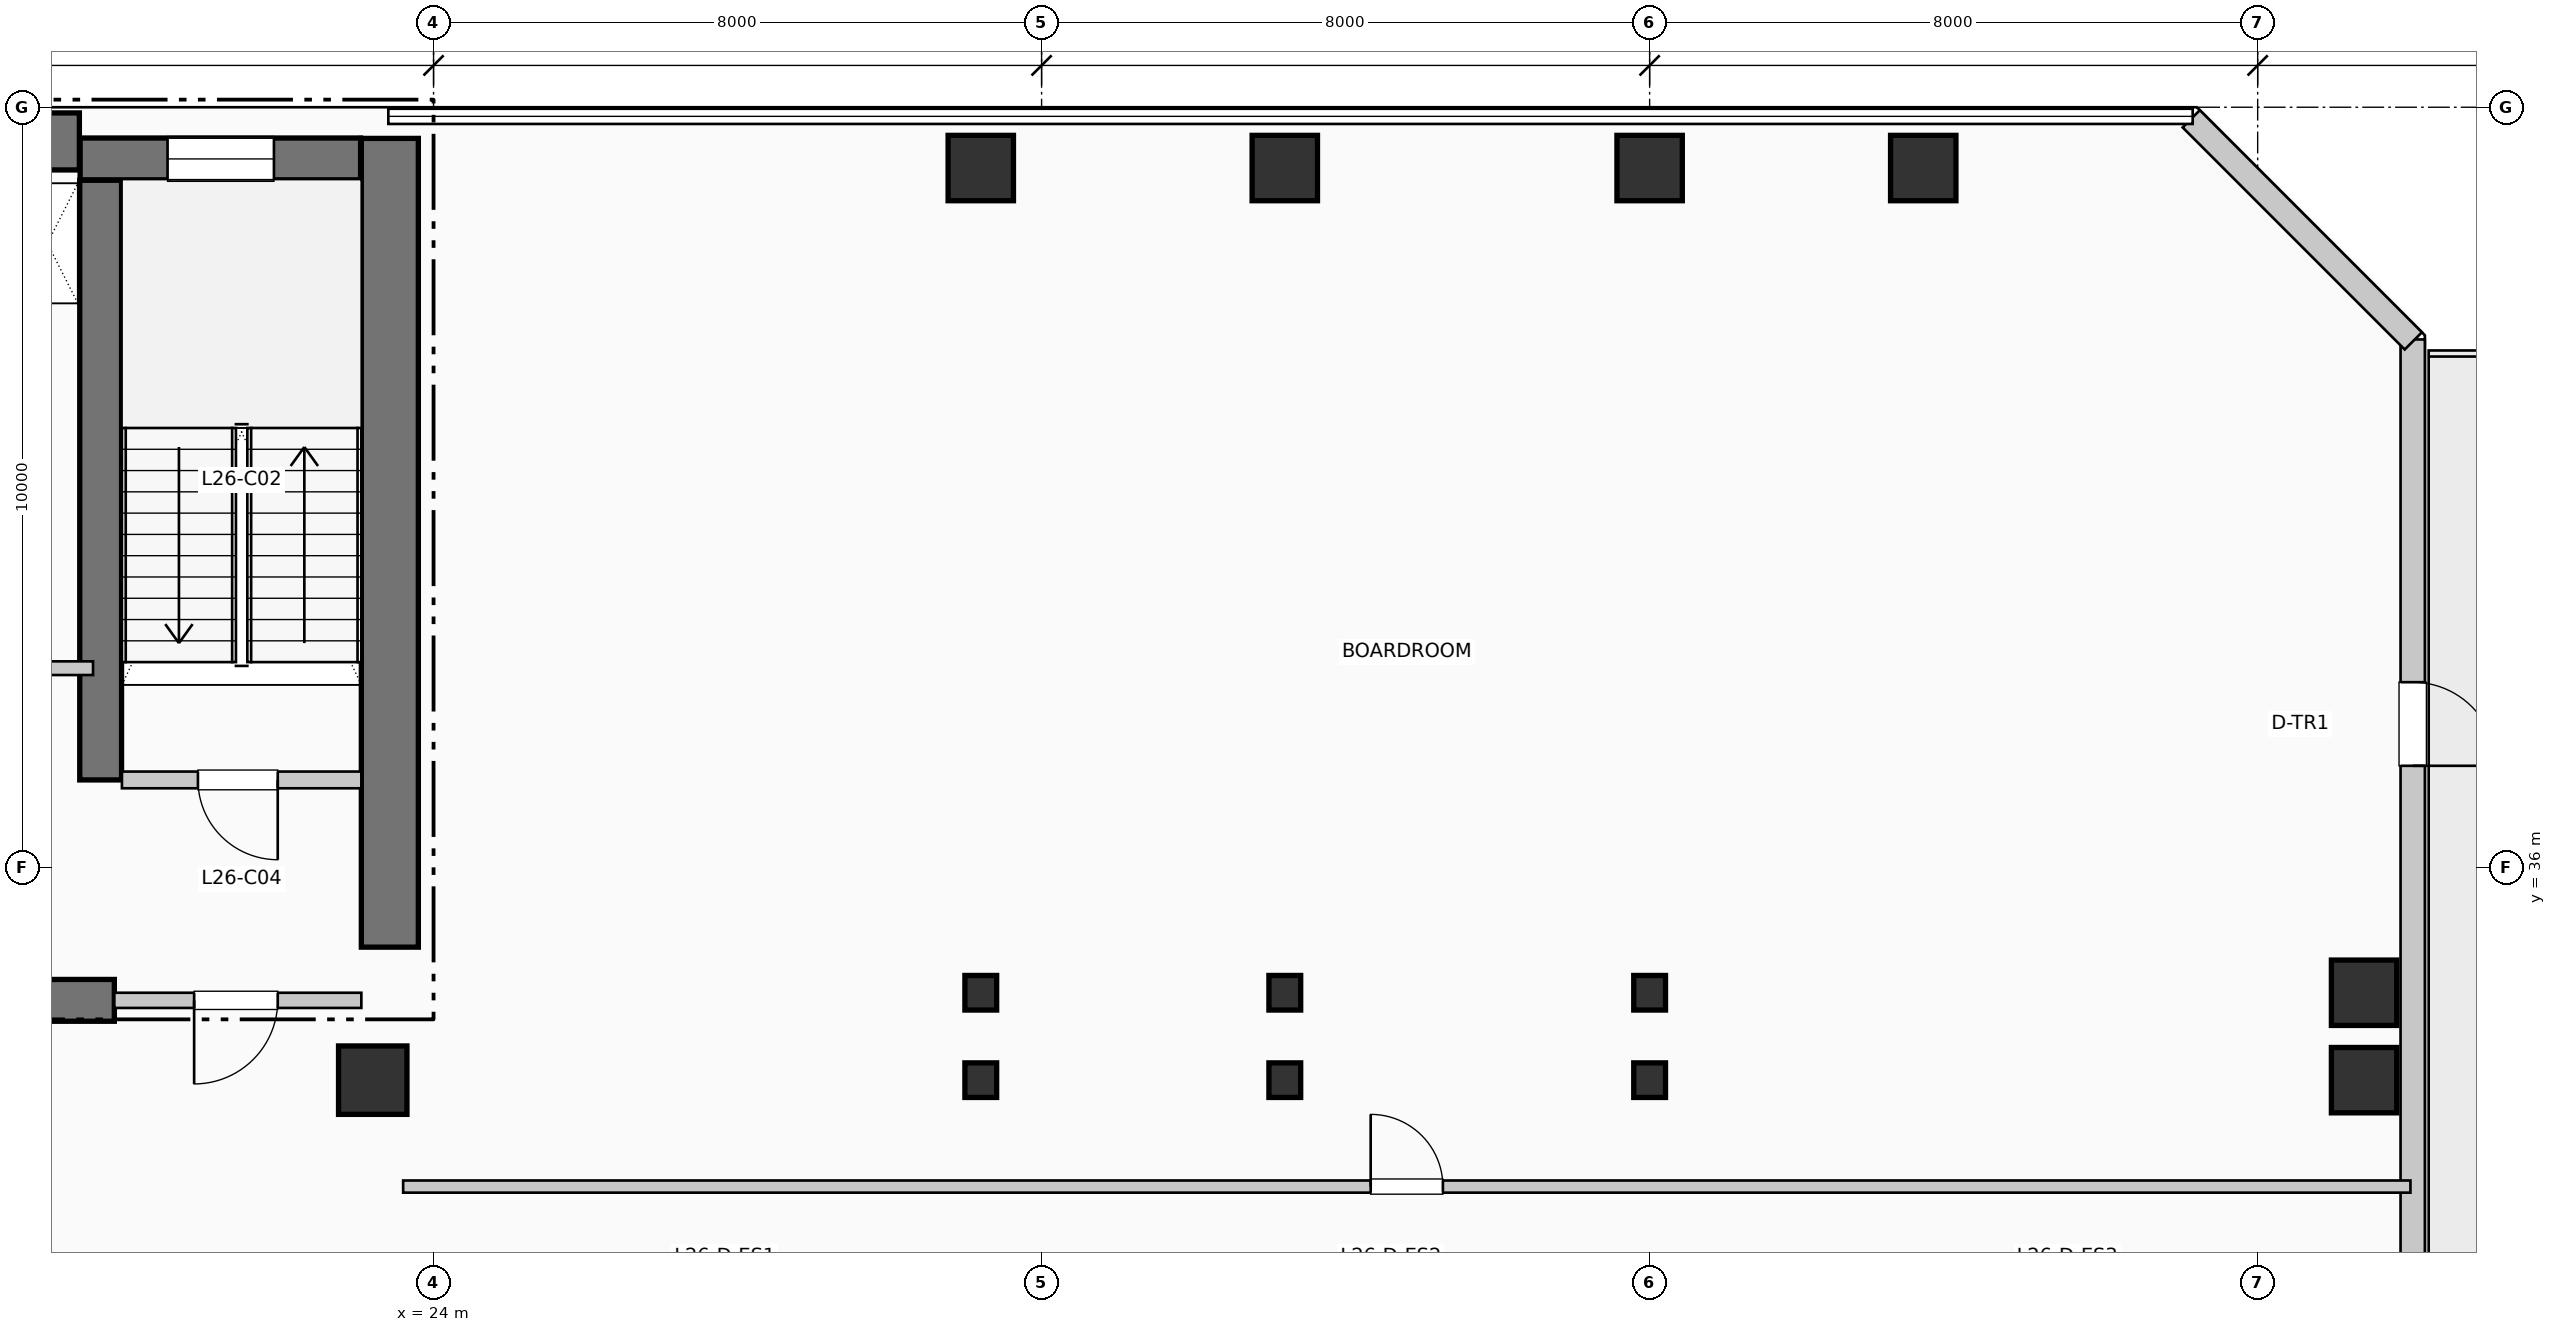
"""IFC4 building model, lengths in metres.
Left out: names, types, materials, properties, quantities, classifications, styles, units other than length and angle.
Written with IfcOpenShell. Run it as: python <this file> out.ifc"""

import sys

from ifc_helpers import new_model, si_unit, direction, frame, frame_2d, origin, origin_2d, place, context, subcontext, project, spatial, rectangle, i_section, extrude, element, fill, save


model = new_model("IFC4")
c1 = context("Model", 3, precision=1e-05, world=origin(), true_north=direction((0.0, 1.0)))
c2 = subcontext(c1, "Body", "Model", "MODEL_VIEW")
j1 = project(units=[si_unit("LENGTHUNIT", "METRE"), si_unit("PLANEANGLEUNIT", "RADIAN")], contexts=[c1])
p1 = place(None, origin())
s1 = spatial("IfcSite", under=j1, at=p1, CompositionType="ELEMENT")
p2 = place(p1, origin())
s2 = spatial("IfcBuilding", under=s1, at=p2, CompositionType="ELEMENT")
p3 = place(p2, frame((0.0, 0.0, 110.55)))
s3 = spatial("IfcBuildingStorey", under=s2, at=p3, CompositionType="ELEMENT", Elevation=110.55)
p4 = place(p3, frame((5.36, 45.55, 0.0), z_axis=(0.0, 0.0, 1.0), x_axis=(1.0, 0.0, 0.0)))
e1 = element("IfcWall", 1, at=p4, inside=s3, PredefinedType="SHEAR", context=c2, shape_type="SweptSolid", body=[
    extrude(rectangle(XDim=13.98, YDim=0.75, at=frame_2d((6.99, 0.0))), origin(), (0.0, 0.0, 1.0), 3.96),
])
p5 = place(p3, frame((23.425, 34.95, 0.0), z_axis=(0.0, 0.0, 1.0), x_axis=(0.0, 1.0, 0.0)))
e2 = element("IfcWall", 2, at=p5, inside=s3, PredefinedType="SHEAR", context=c2, shape_type="SweptSolid", body=[
    extrude(rectangle(XDim=10.64, YDim=0.75, at=frame_2d((5.32, 0.0))), origin(), (0.0, 0.0, 1.0), 3.96),
])
p6 = place(p3, frame((13.68, 34.25, 0.0), z_axis=(0.0, 0.0, 1.0), x_axis=(1.0, 0.0, 0.0)))
e3 = element("IfcWall", 3, at=p6, inside=s3, PredefinedType="SHEAR", context=c2, shape_type="SweptSolid", body=[
    extrude(rectangle(XDim=6.12, YDim=0.55, at=frame_2d((3.06, 0.0))), origin(), (0.0, 0.0, 1.0), 3.96),
])
p7 = place(p3, frame((19.62, 37.15, 0.0), z_axis=(0.0, 0.0, 1.0), x_axis=(0.0, 1.0, 0.0)))
e4 = element("IfcWall", 4, at=p7, inside=s3, PredefinedType="SHEAR", context=c2, shape_type="SweptSolid", body=[
    extrude(rectangle(XDim=7.89, YDim=0.55, at=frame_2d((3.945, 0.0))), origin(), (0.0, 0.0, 1.0), 3.96),
])
p8 = place(p3, frame((19.35, 45.32, 0.0), z_axis=(0.0, 0.0, 1.0), x_axis=(1.0, 0.0, 0.0)))
e5 = element("IfcWall", 5, at=p8, inside=s3, PredefinedType="SHEAR", context=c2, shape_type="SweptSolid", body=[
    extrude(rectangle(XDim=3.69, YDim=0.55, at=frame_2d((1.845, 0.0))), origin(), (0.0, 0.0, 1.0), 3.96),
])
p9 = place(p8, frame((1.15, 0.0, 1.05)))
e6 = element("IfcOpeningElement", 6, at=p9, cuts=e5, PredefinedType="OPENING", context=c2, shape_type="SweptSolid", body=[
    extrude(rectangle(XDim=1.4, YDim=1.8, at=frame_2d((0.7, 0.9))), frame((0.0, 0.285, 0.0), z_axis=(0.0, -1.0, 0.0), x_axis=(1.0, 0.0, 0.0)), (0.0, 0.0, 1.0), 0.57),
])
p10 = place(p3, frame((23.2, 33.2, 0.0), z_axis=(0.0, 0.0, 1.0), x_axis=(1.0, 0.0, 0.0)))
e7 = element("IfcColumn", 7, at=p10, inside=s3, PredefinedType="COLUMN", context=c2, shape_type="SweptSolid", body=[
    extrude(rectangle(XDim=0.9, YDim=0.9, at=origin_2d()), origin(), (0.0, 0.0, 1.0), 3.96),
])
for number, where, z_axis, x_axis in (
    (8, (31.2, 33.2, 0.0), (0.0, 0.0, 1.0), (1.0, 0.0, 0.0)),
    (9, (31.2, 34.35, 0.0), (0.0, 0.0, 1.0), (1.0, 0.0, 0.0)),
):
    element("IfcColumn", number, at=place(p3, frame(where, z_axis=z_axis, x_axis=x_axis)), inside=s3, PredefinedType="COLUMN", context=c2, shape_type="SweptSolid", body=[
        extrude(i_section(OverallWidth=0.418, OverallDepth=0.455, WebThickness=0.032, FlangeThickness=0.051, at=origin_2d()), origin(), (0.0, 0.0, 1.0), 3.96),
    ])
p11 = place(p3, frame((31.2, 45.2, 0.0), z_axis=(0.0, 0.0, 1.0), x_axis=(1.0, 0.0, 0.0)))
e10 = element("IfcColumn", 10, at=p11, inside=s3, PredefinedType="COLUMN", context=c2, shape_type="SweptSolid", body=[
    extrude(rectangle(XDim=0.86, YDim=0.86, at=origin_2d()), origin(), (0.0, 0.0, 1.0), 3.96),
])
for number, where, z_axis, x_axis in (
    (11, (35.2, 33.2, 0.0), (0.0, 0.0, 1.0), (1.0, 0.0, 0.0)),
    (12, (35.2, 34.35, 0.0), (0.0, 0.0, 1.0), (1.0, 0.0, 0.0)),
):
    element("IfcColumn", number, at=place(p3, frame(where, z_axis=z_axis, x_axis=x_axis)), inside=s3, PredefinedType="COLUMN", context=c2, shape_type="SweptSolid", body=[
        extrude(i_section(OverallWidth=0.418, OverallDepth=0.455, WebThickness=0.032, FlangeThickness=0.051, at=origin_2d()), origin(), (0.0, 0.0, 1.0), 3.96),
    ])
p12 = place(p3, frame((35.2, 45.2, 0.0), z_axis=(0.0, 0.0, 1.0), x_axis=(1.0, 0.0, 0.0)))
e13 = element("IfcColumn", 13, at=p12, inside=s3, PredefinedType="COLUMN", context=c2, shape_type="SweptSolid", body=[
    extrude(rectangle(XDim=0.86, YDim=0.86, at=origin_2d()), origin(), (0.0, 0.0, 1.0), 3.96),
])
for number, where, z_axis, x_axis in (
    (14, (40.0, 33.2, 0.0), (0.0, 0.0, 1.0), (1.0, 0.0, 0.0)),
    (15, (40.0, 34.35, 0.0), (0.0, 0.0, 1.0), (1.0, 0.0, 0.0)),
):
    element("IfcColumn", number, at=place(p3, frame(where, z_axis=z_axis, x_axis=x_axis)), inside=s3, PredefinedType="COLUMN", context=c2, shape_type="SweptSolid", body=[
        extrude(i_section(OverallWidth=0.418, OverallDepth=0.455, WebThickness=0.032, FlangeThickness=0.051, at=origin_2d()), origin(), (0.0, 0.0, 1.0), 3.96),
    ])
for number, where, z_axis, x_axis in (
    (16, (40.0, 45.2, 0.0), (0.0, 0.0, 1.0), (1.0, 0.0, 0.0)),
    (17, (43.6, 45.2, 0.0), (0.0, 0.0, 1.0), (1.0, 0.0, 0.0)),
    (18, (49.4, 33.2, 0.0), (0.0, 0.0, 1.0), (1.0, 0.0, 0.0)),
    (19, (49.4, 34.35, 0.0), (0.0, 0.0, 1.0), (1.0, 0.0, 0.0)),
):
    element("IfcColumn", number, at=place(p3, frame(where, z_axis=z_axis, x_axis=x_axis)), inside=s3, PredefinedType="COLUMN", context=c2, shape_type="SweptSolid", body=[
        extrude(rectangle(XDim=0.86, YDim=0.86, at=origin_2d()), origin(), (0.0, 0.0, 1.0), 3.96),
    ])
p13 = place(p3, frame((50.04, 25.055, 0.0), z_axis=(0.0, 0.0, 1.0), x_axis=(0.0, 1.0, 0.0)))
e20 = element("IfcWall", 20, at=p13, inside=s3, PredefinedType="SOLIDWALL", context=c2, shape_type="SweptSolid", body=[
    extrude(rectangle(XDim=17.89, YDim=0.32, at=frame_2d((8.945, 0.0))), origin(), (0.0, 0.0, 1.0), 3.71),
])
p14 = place(p13, frame((13.381, 0.0, 0.0), z_axis=(0.0, 0.0, 1.0), x_axis=(-1.0, 0.0, 0.0)))
e21 = element("IfcOpeningElement", 21, at=p14, cuts=e20, PredefinedType="OPENING", context=c2, shape_type="SweptSolid", body=[
    extrude(rectangle(XDim=1.1, YDim=2.2, at=frame_2d((0.55, 1.1))), frame((0.0, 0.17, 0.0), z_axis=(0.0, -1.0, 0.0), x_axis=(1.0, 0.0, 0.0)), (0.0, 0.0, 1.0), 0.34),
])
p15 = place(p3, frame((50.048, 42.926, 0.0), z_axis=(0.0, 0.0, 1.0), x_axis=(-0.707136318428, 0.707077242712, 0.0)))
e22 = element("IfcWall", 22, at=p15, inside=s3, PredefinedType="SOLIDWALL", context=c2, shape_type="SweptSolid", body=[
    extrude(rectangle(XDim=4.133, YDim=0.32, at=frame_2d((2.066, 0.0))), origin(), (0.0, 0.0, 1.0), 3.71),
])
p16 = place(p3, frame((19.9, 37.15, 0.0), z_axis=(0.0, 0.0, 1.0), x_axis=(1.0, 0.0, 0.0)))
e23 = element("IfcWall", 23, at=p16, inside=s3, PredefinedType="PARTITIONING", context=c2, shape_type="SweptSolid", body=[
    extrude(rectangle(XDim=3.15, YDim=0.22, at=frame_2d((1.575, 0.0))), origin(), (0.0, 0.0, 1.0), 3.71),
])
p17 = place(p16, frame((2.05, 0.0, 0.0), z_axis=(0.0, 0.0, 1.0), x_axis=(-1.0, 0.0, 0.0)))
e24 = element("IfcOpeningElement", 24, at=p17, cuts=e23, PredefinedType="OPENING", context=c2, shape_type="SweptSolid", body=[
    extrude(rectangle(XDim=1.05, YDim=2.15, at=frame_2d((0.525, 1.075))), frame((0.0, 0.12, 0.0), z_axis=(0.0, -1.0, 0.0), x_axis=(1.0, 0.0, 0.0)), (0.0, 0.0, 1.0), 0.24),
])
p18 = place(p3, frame((19.8, 34.25, 0.0), z_axis=(0.0, 0.0, 1.0), x_axis=(1.0, 0.0, 0.0)))
e25 = element("IfcWall", 25, at=p18, inside=s3, PredefinedType="PARTITIONING", context=c2, shape_type="SweptSolid", body=[
    extrude(rectangle(XDim=3.25, YDim=0.2, at=frame_2d((1.625, 0.0))), origin(), (0.0, 0.0, 1.0), 3.71),
])
p19 = place(p18, frame((2.15, 0.0, 0.0), z_axis=(0.0, 0.0, 1.0), x_axis=(-1.0, 0.0, 0.0)))
e26 = element("IfcOpeningElement", 26, at=p19, cuts=e25, PredefinedType="OPENING", context=c2, shape_type="SweptSolid", body=[
    extrude(rectangle(XDim=1.1, YDim=2.15, at=frame_2d((0.55, 1.075))), frame((0.0, 0.11, 0.0), z_axis=(0.0, -1.0, 0.0), x_axis=(1.0, 0.0, 0.0)), (0.0, 0.0, 1.0), 0.22),
])
p20 = place(p3, frame((17.68, 38.62, 0.0), z_axis=(0.0, 0.0, 1.0), x_axis=(1.0, 0.0, 0.0)))
e27 = element("IfcWall", 27, at=p20, inside=s3, PredefinedType="PARTITIONING", context=c2, shape_type="SweptSolid", body=[
    extrude(rectangle(XDim=1.84, YDim=0.18, at=frame_2d((0.92, 0.0))), origin(), (0.0, 0.0, 1.0), 3.71),
])
p21 = place(p20, frame((0.24, 0.0, 0.0)))
e28 = element("IfcOpeningElement", 28, at=p21, cuts=e27, PredefinedType="OPENING", context=c2, shape_type="SweptSolid", body=[
    extrude(rectangle(XDim=0.92, YDim=2.1, at=frame_2d((0.46, 1.05))), frame((0.0, 0.1, 0.0), z_axis=(0.0, -1.0, 0.0), x_axis=(1.0, 0.0, 0.0)), (0.0, 0.0, 1.0), 0.2),
])
p22 = place(p3, frame((23.6, 31.8, 0.0), z_axis=(0.0, 0.0, 1.0), x_axis=(1.0, 0.0, 0.0)))
e29 = element("IfcWall", 29, at=p22, inside=s3, PredefinedType="PARTITIONING", context=c2, shape_type="SweptSolid", body=[
    extrude(rectangle(XDim=26.41, YDim=0.16, at=frame_2d((13.205, 0.0))), origin(), (0.0, 0.0, 1.0), 3.71),
])
p23 = place(p22, frame((12.73, 0.0, 0.0)))
e30 = element("IfcOpeningElement", 30, at=p23, cuts=e29, PredefinedType="OPENING", context=c2, shape_type="SweptSolid", body=[
    extrude(rectangle(XDim=0.95, YDim=2.15, at=frame_2d((0.475, 1.075))), frame((0.0, 0.09, 0.0), z_axis=(0.0, -1.0, 0.0), x_axis=(1.0, 0.0, 0.0)), (0.0, 0.0, 1.0), 0.18),
])
p24 = place(p9, origin())
e31 = element("IfcWindow", 31, at=p24, inside=s3, PartitioningType="SINGLE_PANEL", PredefinedType="WINDOW", context=c2, shape_type="SweptSolid", body=[
    extrude(rectangle(XDim=1.4, YDim=1.8, at=frame_2d((0.7, 0.9))), frame((0.0, 0.03, 0.0), z_axis=(0.0, -1.0, 0.0), x_axis=(1.0, 0.0, 0.0)), (0.0, 0.0, 1.0), 0.06),
])
fill(e6, e31)
p25 = place(p14, origin())
e32 = element("IfcDoor", 32, at=p25, inside=s3, OperationType="SINGLE_SWING_LEFT", PredefinedType="DOOR", context=c2, shape_type="SweptSolid", body=[
    extrude(rectangle(XDim=1.1, YDim=2.2, at=frame_2d((0.55, 1.1))), frame((0.0, 0.025, 0.0), z_axis=(0.0, -1.0, 0.0), x_axis=(1.0, 0.0, 0.0)), (0.0, 0.0, 1.0), 0.05),
])
fill(e21, e32)
p26 = place(p17, origin())
e33 = element("IfcDoor", 33, at=p26, inside=s3, OperationType="SINGLE_SWING_RIGHT", PredefinedType="DOOR", context=c2, shape_type="SweptSolid", body=[
    extrude(rectangle(XDim=1.05, YDim=2.15, at=frame_2d((0.525, 1.075))), frame((0.0, 0.025, 0.0), z_axis=(0.0, -1.0, 0.0), x_axis=(1.0, 0.0, 0.0)), (0.0, 0.0, 1.0), 0.05),
])
fill(e24, e33)
p27 = place(p19, origin())
e34 = element("IfcDoor", 34, at=p27, inside=s3, OperationType="SINGLE_SWING_LEFT", PredefinedType="DOOR", context=c2, shape_type="SweptSolid", body=[
    extrude(rectangle(XDim=1.1, YDim=2.15, at=frame_2d((0.55, 1.075))), frame((0.0, 0.025, 0.0), z_axis=(0.0, -1.0, 0.0), x_axis=(1.0, 0.0, 0.0)), (0.0, 0.0, 1.0), 0.05),
])
fill(e26, e34)
p28 = place(p23, origin())
e35 = element("IfcDoor", 35, at=p28, inside=s3, OperationType="SINGLE_SWING_LEFT", PredefinedType="DOOR", context=c2, shape_type="SweptSolid", body=[
    extrude(rectangle(XDim=0.95, YDim=2.15, at=frame_2d((0.475, 1.075))), frame((0.0, 0.025, 0.0), z_axis=(0.0, -1.0, 0.0), x_axis=(1.0, 0.0, 0.0)), (0.0, 0.0, 1.0), 0.05),
])
fill(e30, e35)
save(model, sys.argv[1])
